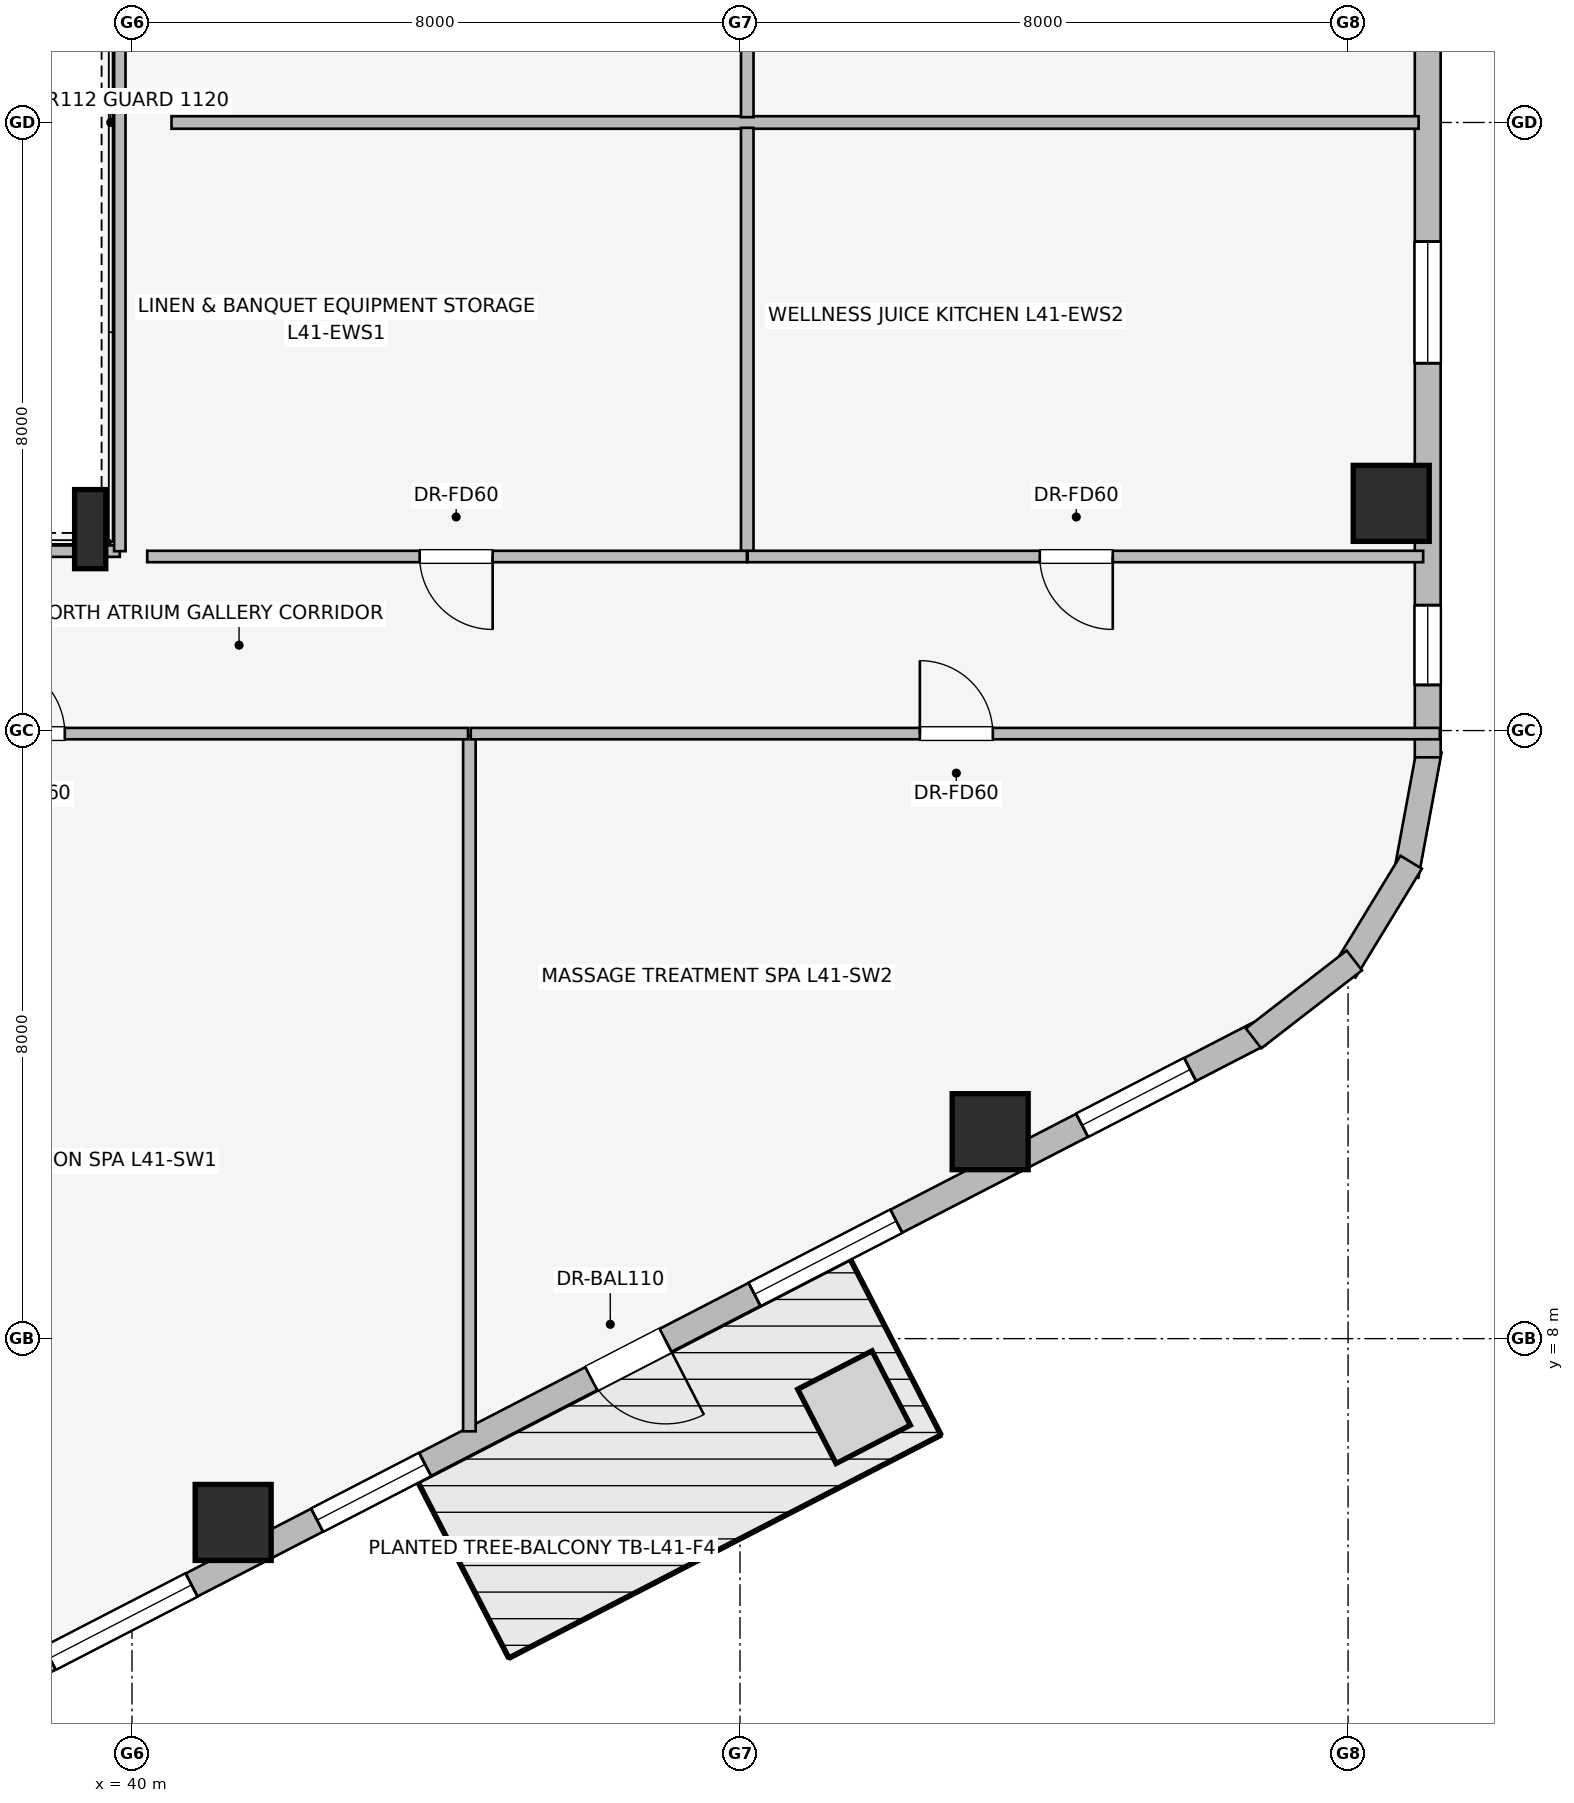
"""IFC4 building model, lengths in metres.
Left out: names, types, materials, properties, quantities, classifications, styles, units other than length and angle.
Written with IfcOpenShell. Run it as: python <this file> out.ifc"""

import sys

from ifc_helpers import new_model, si_unit, direction, frame, frame_2d, origin, origin_2d, place, context, subcontext, project, spatial, rectangle, i_section, extrude, element, fill, save


model = new_model("IFC4")
c1 = context("Model", 3, precision=1e-05, world=origin(), true_north=direction((0.0, 1.0)))
c2 = subcontext(c1, "Body", "Model", "MODEL_VIEW")
j1 = project(units=[si_unit("LENGTHUNIT", "METRE"), si_unit("PLANEANGLEUNIT", "RADIAN")], contexts=[c1])
p1 = place(None, origin())
s1 = spatial("IfcSite", under=j1, at=p1, CompositionType="ELEMENT")
p2 = place(p1, origin())
s2 = spatial("IfcBuilding", under=s1, at=p2, CompositionType="ELEMENT")
p3 = place(p2, frame((0.0, 0.0, 153.3)))
s3 = spatial("IfcBuildingStorey", under=s2, at=p3, CompositionType="ELEMENT", Elevation=153.3)
for number, where, z_axis, x_axis in (
    (1, (41.331, 5.582, 0.0), (0.0, 0.0, 1.0), (1.0, 0.0, 0.0)),
    (2, (51.291, 10.723, 0.0), (0.0, 0.0, 1.0), (1.0, 0.0, 0.0)),
    (3, (56.568, 18.989, 0.0), (0.0, 0.0, 1.0), (1.0, 0.0, 0.0)),
):
    element("IfcColumn", number, at=place(p3, frame(where, z_axis=z_axis, x_axis=x_axis)), inside=s3, PredefinedType="COLUMN", context=c2, shape_type="SweptSolid", body=[
        extrude(rectangle(XDim=1.0, YDim=1.0, at=origin_2d()), origin(), (0.0, 0.0, 1.0), 3.45),
    ])
p4 = place(p3, frame((39.45, 18.65, 0.0), z_axis=(0.0, 0.0, 1.0), x_axis=(1.0, 0.0, 0.0)))
e4 = element("IfcColumn", 4, at=p4, inside=s3, PredefinedType="COLUMN", context=c2, shape_type="SweptSolid", body=[
    extrude(i_section(OverallWidth=0.41, OverallDepth=1.041, WebThickness=0.031, FlangeThickness=0.056, at=origin_2d()), origin(), (0.0, 0.0, 1.0), 3.45),
])
p5 = place(p3, frame((54.831, 12.01, 0.0), z_axis=(0.0, 0.0, 1.0), x_axis=(-0.888613612362, -0.458656568606, 0.0)))
e5 = element("IfcWall", 5, at=p5, inside=s3, PredefinedType="STANDARD", context=c2, shape_type="SweptSolid", body=[
    extrude(rectangle(XDim=18.681, YDim=0.34, at=frame_2d((9.34, 0.0))), origin(), (0.0, 0.0, 1.0), 3.19),
])
p6 = place(p5, frame((8.79, 0.0, 0.0)))
e6 = element("IfcOpeningElement", 6, at=p6, cuts=e5, PredefinedType="OPENING", context=c2, shape_type="SweptSolid", body=[
    extrude(rectangle(XDim=1.1, YDim=2.04, at=frame_2d((0.55, 1.02))), frame((0.0, 0.18, 0.0), z_axis=(0.0, -1.0, 0.0), x_axis=(1.0, 0.0, 0.0)), (0.0, 0.0, 1.0), 0.36),
])
p7 = place(p5, frame((1.023, 0.0, 0.75)))
e7 = element("IfcOpeningElement", 7, at=p7, cuts=e5, PredefinedType="OPENING", context=c2, shape_type="SweptSolid", body=[
    extrude(rectangle(XDim=1.6, YDim=1.55, at=frame_2d((0.8, 0.775))), frame((0.0, 0.18, 0.0), z_axis=(0.0, -1.0, 0.0), x_axis=(1.0, 0.0, 0.0)), (0.0, 0.0, 1.0), 0.36),
])
p8 = place(p5, frame((5.373, 0.0, 0.75)))
e8 = element("IfcOpeningElement", 8, at=p8, cuts=e5, PredefinedType="OPENING", context=c2, shape_type="SweptSolid", body=[
    extrude(rectangle(XDim=2.1, YDim=1.5, at=frame_2d((1.05, 0.75))), frame((0.0, 0.18, 0.0), z_axis=(0.0, -1.0, 0.0), x_axis=(1.0, 0.0, 0.0)), (0.0, 0.0, 1.0), 0.36),
])
p9 = place(p5, frame((12.35, 0.0, 0.75)))
e9 = element("IfcOpeningElement", 9, at=p9, cuts=e5, PredefinedType="OPENING", context=c2, shape_type="SweptSolid", body=[
    extrude(rectangle(XDim=1.6, YDim=1.55, at=frame_2d((0.8, 0.775))), frame((0.0, 0.18, 0.0), z_axis=(0.0, -1.0, 0.0), x_axis=(1.0, 0.0, 0.0)), (0.0, 0.0, 1.0), 0.36),
])
p10 = place(p5, frame((15.808, 0.0, 0.75)))
e10 = element("IfcOpeningElement", 10, at=p10, cuts=e5, PredefinedType="OPENING", context=c2, shape_type="SweptSolid", body=[
    extrude(rectangle(XDim=2.1, YDim=1.5, at=frame_2d((1.05, 0.75))), frame((0.0, 0.18, 0.0), z_axis=(0.0, -1.0, 0.0), x_axis=(1.0, 0.0, 0.0)), (0.0, 0.0, 1.0), 0.36),
])
p11 = place(p3, frame((57.068, 15.742, 0.0), z_axis=(0.0, 0.0, 1.0), x_axis=(-0.181984991895, -0.983301308209, 0.0)))
e11 = element("IfcWall", 11, at=p11, inside=s3, PredefinedType="STANDARD", context=c2, shape_type="SweptSolid", body=[
    extrude(rectangle(XDim=1.677, YDim=0.33, at=frame_2d((0.838, 0.0))), origin(), (0.0, 0.0, 1.0), 3.19),
])
p12 = place(p3, frame((56.83, 14.268, 0.0), z_axis=(0.0, 0.0, 1.0), x_axis=(-0.520519429557, -0.853849824883, 0.0)))
e12 = element("IfcWall", 12, at=p12, inside=s3, PredefinedType="STANDARD", context=c2, shape_type="SweptSolid", body=[
    extrude(rectangle(XDim=1.677, YDim=0.33, at=frame_2d((0.839, 0.0))), origin(), (0.0, 0.0, 1.0), 3.19),
])
p13 = place(p3, frame((56.082, 12.976, 0.0), z_axis=(0.0, 0.0, 1.0), x_axis=(-0.790621329885, -0.612305408053, 0.0)))
e13 = element("IfcWall", 13, at=p13, inside=s3, PredefinedType="STANDARD", context=c2, shape_type="SweptSolid", body=[
    extrude(rectangle(XDim=1.676, YDim=0.33, at=frame_2d((0.838, 0.0))), origin(), (0.0, 0.0, 1.0), 3.19),
])
p14 = place(p3, frame((57.048, 32.352, 0.0), z_axis=(0.0, 0.0, 1.0), x_axis=(0.0, -1.0, 0.0)))
e14 = element("IfcWall", 14, at=p14, inside=s3, PredefinedType="STANDARD", context=c2, shape_type="SweptSolid", body=[
    extrude(rectangle(XDim=16.704, YDim=0.34, at=frame_2d((8.352, 0.0))), origin(), (0.0, 0.0, 1.0), 3.19),
])
p15 = place(p14, frame((0.992, 0.0, 0.75)))
e15 = element("IfcOpeningElement", 15, at=p15, cuts=e14, PredefinedType="OPENING", context=c2, shape_type="SweptSolid", body=[
    extrude(rectangle(XDim=1.05, YDim=1.4, at=frame_2d((0.525, 0.7))), frame((0.0, 0.18, 0.0), z_axis=(0.0, -1.0, 0.0), x_axis=(1.0, 0.0, 0.0)), (0.0, 0.0, 1.0), 0.36),
])
p16 = place(p14, frame((4.935, 0.0, 0.75)))
e16 = element("IfcOpeningElement", 16, at=p16, cuts=e14, PredefinedType="OPENING", context=c2, shape_type="SweptSolid", body=[
    extrude(rectangle(XDim=2.1, YDim=1.5, at=frame_2d((1.05, 0.75))), frame((0.0, 0.18, 0.0), z_axis=(0.0, -1.0, 0.0), x_axis=(1.0, 0.0, 0.0)), (0.0, 0.0, 1.0), 0.36),
])
p17 = place(p14, frame((9.919, 0.0, 0.75)))
e17 = element("IfcOpeningElement", 17, at=p17, cuts=e14, PredefinedType="OPENING", context=c2, shape_type="SweptSolid", body=[
    extrude(rectangle(XDim=1.6, YDim=1.55, at=frame_2d((0.8, 0.775))), frame((0.0, 0.18, 0.0), z_axis=(0.0, -1.0, 0.0), x_axis=(1.0, 0.0, 0.0)), (0.0, 0.0, 1.0), 0.36),
])
p18 = place(p14, frame((14.702, 0.0, 0.75)))
e18 = element("IfcOpeningElement", 18, at=p18, cuts=e14, PredefinedType="OPENING", context=c2, shape_type="SweptSolid", body=[
    extrude(rectangle(XDim=1.05, YDim=1.4, at=frame_2d((0.525, 0.7))), frame((0.0, 0.18, 0.0), z_axis=(0.0, -1.0, 0.0), x_axis=(1.0, 0.0, 0.0)), (0.0, 0.0, 1.0), 0.36),
])
p19 = place(p3, frame((27.675, 18.36, 0.0), z_axis=(0.0, 0.0, 1.0), x_axis=(1.0, 0.0, 0.0)))
e19 = element("IfcWall", 19, at=p19, inside=s3, PredefinedType="PARTITIONING", context=c2, shape_type="SweptSolid", body=[
    extrude(rectangle(XDim=12.165, YDim=0.15, at=frame_2d((6.083, 0.0))), origin(), (0.0, 0.0, 1.0), 2.331),
])
p20 = place(p3, frame((39.84, 18.36, 0.0), z_axis=(0.0, 0.0, 1.0), x_axis=(0.0, 1.0, 0.0)))
e20 = element("IfcWall", 20, at=p20, inside=s3, PredefinedType="PARTITIONING", context=c2, shape_type="SweptSolid", body=[
    extrude(rectangle(XDim=11.28, YDim=0.15, at=frame_2d((5.64, 0.0))), origin(), (0.0, 0.0, 1.0), 3.19),
])
p21 = place(p3, frame((40.52, 24.0, 0.0), z_axis=(0.0, 0.0, 1.0), x_axis=(1.0, 0.0, 0.0)))
e21 = element("IfcWall", 21, at=p21, inside=s3, PredefinedType="PARTITIONING", context=c2, shape_type="SweptSolid", body=[
    extrude(rectangle(XDim=16.408, YDim=0.165, at=frame_2d((8.204, 0.0))), origin(), (0.0, 0.0, 1.0), 3.19),
])
for number, where, z_axis, x_axis in (
    (22, (48.095, 24.07, 0.0), (0.0, 0.0, 1.0), (0.0, 1.0, 0.0)),
    (23, (48.095, 18.29, 0.0), (0.0, 0.0, 1.0), (0.0, 1.0, 0.0)),
):
    element("IfcWall", number, at=place(p3, frame(where, z_axis=z_axis, x_axis=x_axis)), inside=s3, PredefinedType="PARTITIONING", context=c2, shape_type="SweptSolid", body=[
        extrude(rectangle(XDim=5.64, YDim=0.165, at=frame_2d((2.82, 0.0))), origin(), (0.0, 0.0, 1.0), 3.19),
    ])
p22 = place(p3, frame((48.09, 18.29, 0.0), z_axis=(0.0, 0.0, 1.0), x_axis=(-1.0, 0.0, 0.0)))
e24 = element("IfcWall", 24, at=p22, inside=s3, PredefinedType="PARTITIONING", context=c2, shape_type="SweptSolid", body=[
    extrude(rectangle(XDim=7.89, YDim=0.15, at=frame_2d((3.945, 0.0))), origin(), (0.0, 0.0, 1.0), 3.19),
])
p23 = place(p22, frame((3.345, 0.0, 0.0)))
e25 = element("IfcOpeningElement", 25, at=p23, cuts=e24, PredefinedType="OPENING", context=c2, shape_type="SweptSolid", body=[
    extrude(rectangle(XDim=0.96, YDim=2.0, at=frame_2d((0.48, 1.0))), frame((0.0, 0.085, 0.0), z_axis=(0.0, -1.0, 0.0), x_axis=(1.0, 0.0, 0.0)), (0.0, 0.0, 1.0), 0.17),
])
p24 = place(p3, frame((56.988, 18.29, 0.0), z_axis=(0.0, 0.0, 1.0), x_axis=(-1.0, 0.0, 0.0)))
e26 = element("IfcWall", 26, at=p24, inside=s3, PredefinedType="PARTITIONING", context=c2, shape_type="SweptSolid", body=[
    extrude(rectangle(XDim=8.888, YDim=0.15, at=frame_2d((4.444, 0.0))), origin(), (0.0, 0.0, 1.0), 3.19),
])
p25 = place(p24, frame((4.084, 0.0, 0.0)))
e27 = element("IfcOpeningElement", 27, at=p25, cuts=e26, PredefinedType="OPENING", context=c2, shape_type="SweptSolid", body=[
    extrude(rectangle(XDim=0.96, YDim=2.0, at=frame_2d((0.48, 1.0))), frame((0.0, 0.085, 0.0), z_axis=(0.0, -1.0, 0.0), x_axis=(1.0, 0.0, 0.0)), (0.0, 0.0, 1.0), 0.17),
])
p26 = place(p3, frame((44.439, 6.781, 0.0), z_axis=(0.0, 0.0, 1.0), x_axis=(0.0, 1.0, 0.0)))
e28 = element("IfcWall", 28, at=p26, inside=s3, PredefinedType="PARTITIONING", context=c2, shape_type="SweptSolid", body=[
    extrude(rectangle(XDim=9.149, YDim=0.165, at=frame_2d((4.574, 0.0))), origin(), (0.0, 0.0, 1.0), 3.19),
])
p27 = place(p3, frame((32.85, 15.96, 0.0), z_axis=(0.0, 0.0, 1.0), x_axis=(1.0, 0.0, 0.0)))
e29 = element("IfcWall", 29, at=p27, inside=s3, PredefinedType="PARTITIONING", context=c2, shape_type="SweptSolid", body=[
    extrude(rectangle(XDim=11.571, YDim=0.15, at=frame_2d((5.785, 0.0))), origin(), (0.0, 0.0, 1.0), 3.19),
])
p28 = place(p27, frame((5.306, 0.0, 0.0)))
e30 = element("IfcOpeningElement", 30, at=p28, cuts=e29, PredefinedType="OPENING", context=c2, shape_type="SweptSolid", body=[
    extrude(rectangle(XDim=0.96, YDim=2.0, at=frame_2d((0.48, 1.0))), frame((0.0, 0.085, 0.0), z_axis=(0.0, -1.0, 0.0), x_axis=(1.0, 0.0, 0.0)), (0.0, 0.0, 1.0), 0.17),
])
p29 = place(p3, frame((44.457, 15.96, 0.0), z_axis=(0.0, 0.0, 1.0), x_axis=(1.0, 0.0, 0.0)))
e31 = element("IfcWall", 31, at=p29, inside=s3, PredefinedType="PARTITIONING", context=c2, shape_type="SweptSolid", body=[
    extrude(rectangle(XDim=12.751, YDim=0.15, at=frame_2d((6.375, 0.0))), origin(), (0.0, 0.0, 1.0), 3.19),
])
p30 = place(p29, frame((5.909, 0.0, 0.0)))
e32 = element("IfcOpeningElement", 32, at=p30, cuts=e31, PredefinedType="OPENING", context=c2, shape_type="SweptSolid", body=[
    extrude(rectangle(XDim=0.96, YDim=2.0, at=frame_2d((0.48, 1.0))), frame((0.0, 0.085, 0.0), z_axis=(0.0, -1.0, 0.0), x_axis=(1.0, 0.0, 0.0)), (0.0, 0.0, 1.0), 0.17),
])
p31 = place(p6, origin())
e33 = element("IfcDoor", 33, at=p31, inside=s3, OperationType="SINGLE_SWING_LEFT", PredefinedType="DOOR", context=c2, shape_type="SweptSolid", body=[
    extrude(rectangle(XDim=1.1, YDim=2.04, at=frame_2d((0.55, 1.02))), frame((0.0, 0.025, 0.0), z_axis=(0.0, -1.0, 0.0), x_axis=(1.0, 0.0, 0.0)), (0.0, 0.0, 1.0), 0.05),
])
fill(e6, e33)
p32 = place(p7, origin())
e34 = element("IfcWindow", 34, at=p32, inside=s3, PartitioningType="SINGLE_PANEL", PredefinedType="WINDOW", context=c2, shape_type="SweptSolid", body=[
    extrude(rectangle(XDim=1.6, YDim=1.55, at=frame_2d((0.8, 0.775))), frame((0.0, 0.03, 0.0), z_axis=(0.0, -1.0, 0.0), x_axis=(1.0, 0.0, 0.0)), (0.0, 0.0, 1.0), 0.06),
])
fill(e7, e34)
p33 = place(p8, origin())
e35 = element("IfcWindow", 35, at=p33, inside=s3, PartitioningType="SINGLE_PANEL", PredefinedType="WINDOW", context=c2, shape_type="SweptSolid", body=[
    extrude(rectangle(XDim=2.1, YDim=1.5, at=frame_2d((1.05, 0.75))), frame((0.0, 0.03, 0.0), z_axis=(0.0, -1.0, 0.0), x_axis=(1.0, 0.0, 0.0)), (0.0, 0.0, 1.0), 0.06),
])
fill(e8, e35)
p34 = place(p9, origin())
e36 = element("IfcWindow", 36, at=p34, inside=s3, PartitioningType="SINGLE_PANEL", PredefinedType="WINDOW", context=c2, shape_type="SweptSolid", body=[
    extrude(rectangle(XDim=1.6, YDim=1.55, at=frame_2d((0.8, 0.775))), frame((0.0, 0.03, 0.0), z_axis=(0.0, -1.0, 0.0), x_axis=(1.0, 0.0, 0.0)), (0.0, 0.0, 1.0), 0.06),
])
fill(e9, e36)
p35 = place(p10, origin())
e37 = element("IfcWindow", 37, at=p35, inside=s3, PartitioningType="SINGLE_PANEL", PredefinedType="WINDOW", context=c2, shape_type="SweptSolid", body=[
    extrude(rectangle(XDim=2.1, YDim=1.5, at=frame_2d((1.05, 0.75))), frame((0.0, 0.03, 0.0), z_axis=(0.0, -1.0, 0.0), x_axis=(1.0, 0.0, 0.0)), (0.0, 0.0, 1.0), 0.06),
])
fill(e10, e37)
p36 = place(p17, origin())
e38 = element("IfcWindow", 38, at=p36, inside=s3, PartitioningType="SINGLE_PANEL", PredefinedType="WINDOW", context=c2, shape_type="SweptSolid", body=[
    extrude(rectangle(XDim=1.6, YDim=1.55, at=frame_2d((0.8, 0.775))), frame((0.0, 0.03, 0.0), z_axis=(0.0, -1.0, 0.0), x_axis=(1.0, 0.0, 0.0)), (0.0, 0.0, 1.0), 0.06),
])
fill(e17, e38)
p37 = place(p18, origin())
e39 = element("IfcWindow", 39, at=p37, inside=s3, PartitioningType="SINGLE_PANEL", PredefinedType="WINDOW", context=c2, shape_type="SweptSolid", body=[
    extrude(rectangle(XDim=1.05, YDim=1.4, at=frame_2d((0.525, 0.7))), frame((0.0, 0.03, 0.0), z_axis=(0.0, -1.0, 0.0), x_axis=(1.0, 0.0, 0.0)), (0.0, 0.0, 1.0), 0.06),
])
fill(e18, e39)
p38 = place(p23, origin())
e40 = element("IfcDoor", 40, at=p38, inside=s3, OperationType="SINGLE_SWING_LEFT", PredefinedType="DOOR", context=c2, shape_type="SweptSolid", body=[
    extrude(rectangle(XDim=0.96, YDim=2.0, at=frame_2d((0.48, 1.0))), frame((0.0, 0.025, 0.0), z_axis=(0.0, -1.0, 0.0), x_axis=(1.0, 0.0, 0.0)), (0.0, 0.0, 1.0), 0.05),
])
fill(e25, e40)
p39 = place(p25, origin())
e41 = element("IfcDoor", 41, at=p39, inside=s3, OperationType="SINGLE_SWING_LEFT", PredefinedType="DOOR", context=c2, shape_type="SweptSolid", body=[
    extrude(rectangle(XDim=0.96, YDim=2.0, at=frame_2d((0.48, 1.0))), frame((0.0, 0.025, 0.0), z_axis=(0.0, -1.0, 0.0), x_axis=(1.0, 0.0, 0.0)), (0.0, 0.0, 1.0), 0.05),
])
fill(e27, e41)
p40 = place(p28, origin())
e42 = element("IfcDoor", 42, at=p40, inside=s3, OperationType="SINGLE_SWING_LEFT", PredefinedType="DOOR", context=c2, shape_type="SweptSolid", body=[
    extrude(rectangle(XDim=0.96, YDim=2.0, at=frame_2d((0.48, 1.0))), frame((0.0, 0.025, 0.0), z_axis=(0.0, -1.0, 0.0), x_axis=(1.0, 0.0, 0.0)), (0.0, 0.0, 1.0), 0.05),
])
fill(e30, e42)
p41 = place(p30, origin())
e43 = element("IfcDoor", 43, at=p41, inside=s3, OperationType="SINGLE_SWING_LEFT", PredefinedType="DOOR", context=c2, shape_type="SweptSolid", body=[
    extrude(rectangle(XDim=0.96, YDim=2.0, at=frame_2d((0.48, 1.0))), frame((0.0, 0.025, 0.0), z_axis=(0.0, -1.0, 0.0), x_axis=(1.0, 0.0, 0.0)), (0.0, 0.0, 1.0), 0.05),
])
fill(e32, e43)
save(model, sys.argv[1])
